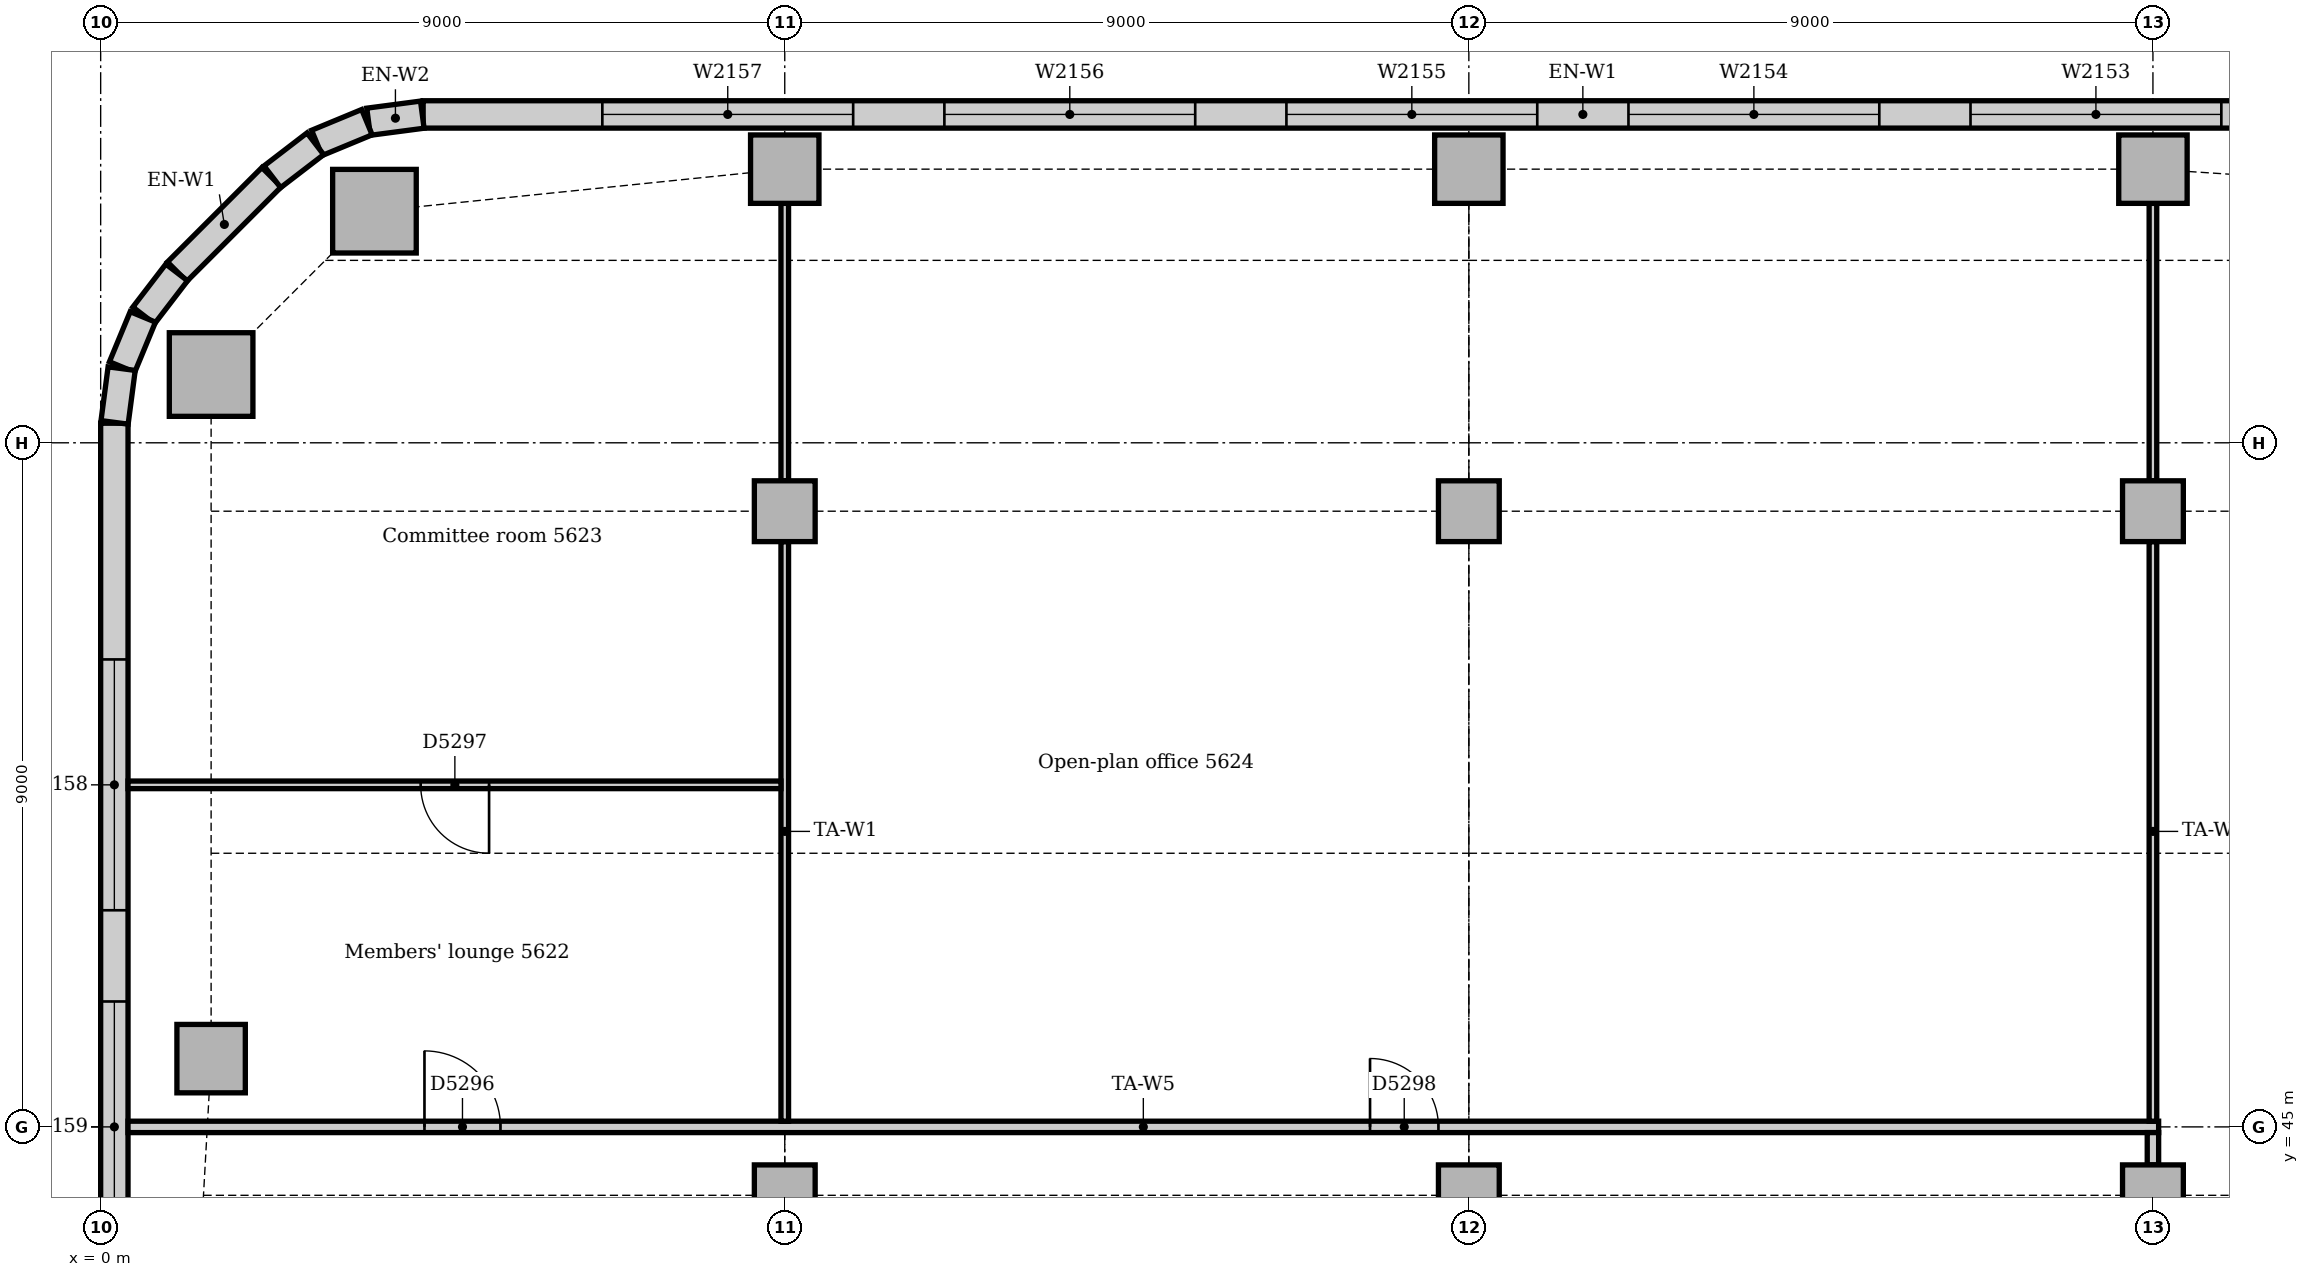
"""IFC4 building model, lengths in metres.
Left out: names, types, materials, properties, quantities, classifications, styles, units other than length and angle.
Written with IfcOpenShell. Run it as: python <this file> out.ifc"""

import sys

from ifc_helpers import new_model, si_unit, direction, frame, frame_2d, origin, origin_2d, place, context, subcontext, project, spatial, rectangle, extrude, element, fill, save


model = new_model("IFC4")
c1 = context("Model", 3, precision=1e-05, world=origin(), true_north=direction((0.0, 1.0)))
c2 = subcontext(c1, "Body", "Model", "MODEL_VIEW")
j1 = project(units=[si_unit("LENGTHUNIT", "METRE"), si_unit("PLANEANGLEUNIT", "RADIAN")], contexts=[c1])
p1 = place(None, origin())
s1 = spatial("IfcSite", under=j1, at=p1, CompositionType="ELEMENT")
p2 = place(p1, origin())
s2 = spatial("IfcBuilding", under=s1, at=p2, CompositionType="ELEMENT")
p3 = place(p2, frame((0.0, 0.0, 234.0)))
s3 = spatial("IfcBuildingStorey", under=s2, at=p3, CompositionType="ELEMENT", Elevation=234.0)
for number, where, z_axis, x_axis in (
    (1, (3.602, 57.047, 0.0), (0.0, 0.0, 1.0), (1.0, 0.0, 0.0)),
    (2, (1.453, 54.898, 0.0), (0.0, 0.0, 1.0), (1.0, 0.0, 0.0)),
):
    element("IfcColumn", number, at=place(p3, frame(where, z_axis=z_axis, x_axis=x_axis)), inside=s3, PredefinedType="COLUMN", context=c2, shape_type="SweptSolid", body=[
        extrude(rectangle(XDim=1.1, YDim=1.1, at=origin_2d()), origin(), (0.0, 0.0, 1.0), 3.85),
    ])
for number, where, z_axis, x_axis in (
    (3, (9.0, 57.6, 0.0), (0.0, 0.0, 1.0), (1.0, 0.0, 0.0)),
    (4, (18.0, 57.6, 0.0), (0.0, 0.0, 1.0), (1.0, 0.0, 0.0)),
    (5, (27.0, 57.6, 0.0), (0.0, 0.0, 1.0), (1.0, 0.0, 0.0)),
    (6, (1.453, 45.898, 0.0), (0.0, 0.0, 1.0), (1.0, 0.0, 0.0)),
):
    element("IfcColumn", number, at=place(p3, frame(where, z_axis=z_axis, x_axis=x_axis)), inside=s3, PredefinedType="COLUMN", context=c2, shape_type="SweptSolid", body=[
        extrude(rectangle(XDim=0.9, YDim=0.9, at=origin_2d()), origin(), (0.0, 0.0, 1.0), 3.85),
    ])
for number, where, z_axis, x_axis in (
    (7, (9.0, 44.1, 0.0), (0.0, 0.0, 1.0), (1.0, 0.0, 0.0)),
    (8, (9.0, 53.1, 0.0), (0.0, 0.0, 1.0), (1.0, 0.0, 0.0)),
    (9, (18.0, 44.1, 0.0), (0.0, 0.0, 1.0), (1.0, 0.0, 0.0)),
    (10, (18.0, 53.1, 0.0), (0.0, 0.0, 1.0), (1.0, 0.0, 0.0)),
    (11, (27.0, 44.1, 0.0), (0.0, 0.0, 1.0), (1.0, 0.0, 0.0)),
    (12, (27.0, 53.1, 0.0), (0.0, 0.0, 1.0), (1.0, 0.0, 0.0)),
):
    element("IfcColumn", number, at=place(p3, frame(where, z_axis=z_axis, x_axis=x_axis)), inside=s3, PredefinedType="COLUMN", context=c2, shape_type="SweptSolid", body=[
        extrude(rectangle(XDim=0.8, YDim=0.8, at=origin_2d()), origin(), (0.0, 0.0, 1.0), 3.85),
    ])
p4 = place(p3, frame((34.757, 58.32, 0.0), z_axis=(0.0, 0.0, 1.0), x_axis=(-1.0, 0.0, 0.0)))
e13 = element("IfcWall", 13, at=p4, inside=s3, PredefinedType="STANDARD", context=c2, shape_type="SweptSolid", body=[
    extrude(rectangle(XDim=30.515, YDim=0.36, at=frame_2d((15.257, 0.0))), origin(), (0.0, 0.0, 1.0), 3.85),
])
p5 = place(p4, frame((2.357, 0.0, 0.9)))
e14 = element("IfcOpeningElement", 14, at=p5, cuts=e13, PredefinedType="OPENING", context=c2, shape_type="SweptSolid", body=[
    extrude(rectangle(XDim=3.3, YDim=1.6, at=frame_2d((1.65, 0.8))), frame((0.0, 0.19, 0.0), z_axis=(0.0, -1.0, 0.0), x_axis=(1.0, 0.0, 0.0)), (0.0, 0.0, 1.0), 0.38),
])
p6 = place(p4, frame((6.857, 0.0, 0.9)))
e15 = element("IfcOpeningElement", 15, at=p6, cuts=e13, PredefinedType="OPENING", context=c2, shape_type="SweptSolid", body=[
    extrude(rectangle(XDim=3.3, YDim=1.6, at=frame_2d((1.65, 0.8))), frame((0.0, 0.19, 0.0), z_axis=(0.0, -1.0, 0.0), x_axis=(1.0, 0.0, 0.0)), (0.0, 0.0, 1.0), 0.38),
])
p7 = place(p4, frame((11.357, 0.0, 0.9)))
e16 = element("IfcOpeningElement", 16, at=p7, cuts=e13, PredefinedType="OPENING", context=c2, shape_type="SweptSolid", body=[
    extrude(rectangle(XDim=3.3, YDim=1.6, at=frame_2d((1.65, 0.8))), frame((0.0, 0.19, 0.0), z_axis=(0.0, -1.0, 0.0), x_axis=(1.0, 0.0, 0.0)), (0.0, 0.0, 1.0), 0.38),
])
p8 = place(p4, frame((15.857, 0.0, 0.9)))
e17 = element("IfcOpeningElement", 17, at=p8, cuts=e13, PredefinedType="OPENING", context=c2, shape_type="SweptSolid", body=[
    extrude(rectangle(XDim=3.3, YDim=1.6, at=frame_2d((1.65, 0.8))), frame((0.0, 0.19, 0.0), z_axis=(0.0, -1.0, 0.0), x_axis=(1.0, 0.0, 0.0)), (0.0, 0.0, 1.0), 0.38),
])
p9 = place(p4, frame((20.357, 0.0, 0.9)))
e18 = element("IfcOpeningElement", 18, at=p9, cuts=e13, PredefinedType="OPENING", context=c2, shape_type="SweptSolid", body=[
    extrude(rectangle(XDim=3.3, YDim=1.6, at=frame_2d((1.65, 0.8))), frame((0.0, 0.19, 0.0), z_axis=(0.0, -1.0, 0.0), x_axis=(1.0, 0.0, 0.0)), (0.0, 0.0, 1.0), 0.38),
])
p10 = place(p4, frame((24.857, 0.0, 0.9)))
e19 = element("IfcOpeningElement", 19, at=p10, cuts=e13, PredefinedType="OPENING", context=c2, shape_type="SweptSolid", body=[
    extrude(rectangle(XDim=3.3, YDim=1.6, at=frame_2d((1.65, 0.8))), frame((0.0, 0.19, 0.0), z_axis=(0.0, -1.0, 0.0), x_axis=(1.0, 0.0, 0.0)), (0.0, 0.0, 1.0), 0.38),
])
p11 = place(p3, frame((2.249, 57.494, 0.0), z_axis=(0.0, 0.0, 1.0), x_axis=(-0.707106781187, -0.707106781187, 0.0)))
e20 = element("IfcWall", 20, at=p11, inside=s3, PredefinedType="STANDARD", context=c2, shape_type="SweptSolid", body=[
    extrude(rectangle(XDim=1.757, YDim=0.36, at=frame_2d((0.879, 0.0))), origin(), (0.0, 0.0, 1.0), 3.85),
])
p12 = place(p3, frame((0.18, 54.257, 0.0), z_axis=(0.0, 0.0, 1.0), x_axis=(0.0, -1.0, 0.0)))
e21 = element("IfcWall", 21, at=p12, inside=s3, PredefinedType="STANDARD", context=c2, shape_type="SweptSolid", body=[
    extrude(rectangle(XDim=12.257, YDim=0.36, at=frame_2d((6.129, 0.0))), origin(), (0.0, 0.0, 1.0), 3.85),
])
p13 = place(p12, frame((3.107, 0.0, 0.9)))
e22 = element("IfcOpeningElement", 22, at=p13, cuts=e21, PredefinedType="OPENING", context=c2, shape_type="SweptSolid", body=[
    extrude(rectangle(XDim=3.3, YDim=1.6, at=frame_2d((1.65, 0.8))), frame((0.0, 0.19, 0.0), z_axis=(0.0, -1.0, 0.0), x_axis=(1.0, 0.0, 0.0)), (0.0, 0.0, 1.0), 0.38),
])
p14 = place(p12, frame((7.607, 0.0, 0.9)))
e23 = element("IfcOpeningElement", 23, at=p14, cuts=e21, PredefinedType="OPENING", context=c2, shape_type="SweptSolid", body=[
    extrude(rectangle(XDim=3.3, YDim=1.6, at=frame_2d((1.65, 0.8))), frame((0.0, 0.19, 0.0), z_axis=(0.0, -1.0, 0.0), x_axis=(1.0, 0.0, 0.0)), (0.0, 0.0, 1.0), 0.38),
])
for number, where, z_axis, x_axis in (
    (24, (4.231, 58.317, 0.0), (0.0, 0.0, 1.0), (-0.991, -0.131, 0.0)),
    (25, (3.503, 58.218, 0.0), (0.0, 0.0, 1.0), (-0.924, -0.383, 0.0)),
):
    element("IfcWall", number, at=place(p3, frame(where, z_axis=z_axis, x_axis=x_axis)), inside=s3, PredefinedType="STANDARD", context=c2, shape_type="SweptSolid", body=[
        extrude(rectangle(XDim=0.713, YDim=0.36, at=frame_2d((0.356, 0.0))), origin(), (0.0, 0.0, 1.0), 3.85),
    ])
for number, where, z_axis, x_axis in (
    (26, (2.825, 57.934, 0.0), (0.0, 0.0, 1.0), (-0.793, -0.609, 0.0)),
    (27, (1.0, 56.241, 0.0), (0.0, 0.0, 1.0), (-0.609, -0.793, 0.0)),
):
    element("IfcWall", number, at=place(p3, frame(where, z_axis=z_axis, x_axis=x_axis)), inside=s3, PredefinedType="STANDARD", context=c2, shape_type="SweptSolid", body=[
        extrude(rectangle(XDim=0.713, YDim=0.36, at=frame_2d((0.357, 0.0))), origin(), (0.0, 0.0, 1.0), 3.85),
    ])
for number, where, z_axis, x_axis in (
    (28, (0.555, 55.656, 0.0), (0.0, 0.0, 1.0), (-0.383, -0.924, 0.0)),
    (29, (0.276, 54.976, 0.0), (0.0, 0.0, 1.0), (-0.131, -0.991, 0.0)),
):
    element("IfcWall", number, at=place(p3, frame(where, z_axis=z_axis, x_axis=x_axis)), inside=s3, PredefinedType="STANDARD", context=c2, shape_type="SweptSolid", body=[
        extrude(rectangle(XDim=0.713, YDim=0.36, at=frame_2d((0.356, 0.0))), origin(), (0.0, 0.0, 1.0), 3.85),
    ])
p15 = place(p3, frame((0.36, 45.0, 0.0), z_axis=(0.0, 0.0, 1.0), x_axis=(1.0, 0.0, 0.0)))
e30 = element("IfcWall", 30, at=p15, inside=s3, PredefinedType="PARTITIONING", context=c2, shape_type="SweptSolid", body=[
    extrude(rectangle(XDim=26.715, YDim=0.15, at=frame_2d((13.357, 0.0))), origin(), (0.0, 0.0, 1.0), 3.85),
])
p16 = place(p15, frame((3.9, 0.0, 0.0)))
e31 = element("IfcOpeningElement", 31, at=p16, cuts=e30, PredefinedType="OPENING", context=c2, shape_type="SweptSolid", body=[
    extrude(rectangle(XDim=1.0, YDim=2.1, at=frame_2d((0.5, 1.05))), frame((0.0, 0.085, 0.0), z_axis=(0.0, -1.0, 0.0), x_axis=(1.0, 0.0, 0.0)), (0.0, 0.0, 1.0), 0.17),
])
p17 = place(p15, frame((16.34, 0.0, 0.0)))
e32 = element("IfcOpeningElement", 32, at=p17, cuts=e30, PredefinedType="OPENING", context=c2, shape_type="SweptSolid", body=[
    extrude(rectangle(XDim=0.9, YDim=2.1, at=frame_2d((0.45, 1.05))), frame((0.0, 0.085, 0.0), z_axis=(0.0, -1.0, 0.0), x_axis=(1.0, 0.0, 0.0)), (0.0, 0.0, 1.0), 0.17),
])
p18 = place(p3, frame((27.0, 44.5, 0.0), z_axis=(0.0, 0.0, 1.0), x_axis=(0.0, 1.0, 0.0)))
e33 = element("IfcWall", 33, at=p18, inside=s3, PredefinedType="PARTITIONING", context=c2, shape_type="SweptSolid", body=[
    extrude(rectangle(XDim=0.425, YDim=0.15, at=frame_2d((0.212, 0.0))), origin(), (0.0, 0.0, 1.0), 3.85),
])
p19 = place(p3, frame((9.0, 45.075, 0.0), z_axis=(0.0, 0.0, 1.0), x_axis=(0.0, 1.0, 0.0)))
e34 = element("IfcWall", 34, at=p19, inside=s3, PredefinedType="PARTITIONING", context=c2, shape_type="SweptSolid", body=[
    extrude(rectangle(XDim=7.625, YDim=0.1, at=frame_2d((3.812, 0.0))), origin(), (0.0, 0.0, 1.0), 3.35),
])
p20 = place(p3, frame((9.0, 53.5, 0.0), z_axis=(0.0, 0.0, 1.0), x_axis=(0.0, 1.0, 0.0)))
e35 = element("IfcWall", 35, at=p20, inside=s3, PredefinedType="PARTITIONING", context=c2, shape_type="SweptSolid", body=[
    extrude(rectangle(XDim=3.65, YDim=0.1, at=frame_2d((1.825, 0.0))), origin(), (0.0, 0.0, 1.0), 3.41),
])
p21 = place(p3, frame((27.0, 45.075, 0.0), z_axis=(0.0, 0.0, 1.0), x_axis=(0.0, 1.0, 0.0)))
e36 = element("IfcWall", 36, at=p21, inside=s3, PredefinedType="PARTITIONING", context=c2, shape_type="SweptSolid", body=[
    extrude(rectangle(XDim=7.625, YDim=0.1, at=frame_2d((3.812, 0.0))), origin(), (0.0, 0.0, 1.0), 3.35),
])
p22 = place(p3, frame((27.0, 53.5, 0.0), z_axis=(0.0, 0.0, 1.0), x_axis=(0.0, 1.0, 0.0)))
e37 = element("IfcWall", 37, at=p22, inside=s3, PredefinedType="PARTITIONING", context=c2, shape_type="SweptSolid", body=[
    extrude(rectangle(XDim=3.65, YDim=0.1, at=frame_2d((1.825, 0.0))), origin(), (0.0, 0.0, 1.0), 3.41),
])
p23 = place(p3, frame((0.36, 49.5, 0.0), z_axis=(0.0, 0.0, 1.0), x_axis=(1.0, 0.0, 0.0)))
e38 = element("IfcWall", 38, at=p23, inside=s3, PredefinedType="PARTITIONING", context=c2, shape_type="SweptSolid", body=[
    extrude(rectangle(XDim=8.59, YDim=0.1, at=frame_2d((4.295, 0.0))), origin(), (0.0, 0.0, 1.0), 3.85),
])
p24 = place(p23, frame((3.85, 0.0, 0.0)))
e39 = element("IfcOpeningElement", 39, at=p24, cuts=e38, PredefinedType="OPENING", context=c2, shape_type="SweptSolid", body=[
    extrude(rectangle(XDim=0.9, YDim=2.1, at=frame_2d((0.45, 1.05))), frame((0.0, 0.06, 0.0), z_axis=(0.0, -1.0, 0.0), x_axis=(1.0, 0.0, 0.0)), (0.0, 0.0, 1.0), 0.12),
])
p25 = place(p6, origin())
e40 = element("IfcWindow", 40, at=p25, inside=s3, PartitioningType="SINGLE_PANEL", PredefinedType="WINDOW", context=c2, shape_type="SweptSolid", body=[
    extrude(rectangle(XDim=3.3, YDim=1.6, at=frame_2d((1.65, 0.8))), frame((0.0, 0.13, 0.0), z_axis=(0.0, -1.0, 0.0), x_axis=(1.0, 0.0, 0.0)), (0.0, 0.0, 1.0), 0.06),
])
fill(e15, e40)
p26 = place(p7, origin())
e41 = element("IfcWindow", 41, at=p26, inside=s3, PartitioningType="SINGLE_PANEL", PredefinedType="WINDOW", context=c2, shape_type="SweptSolid", body=[
    extrude(rectangle(XDim=3.3, YDim=1.6, at=frame_2d((1.65, 0.8))), frame((0.0, 0.13, 0.0), z_axis=(0.0, -1.0, 0.0), x_axis=(1.0, 0.0, 0.0)), (0.0, 0.0, 1.0), 0.06),
])
fill(e16, e41)
p27 = place(p8, origin())
e42 = element("IfcWindow", 42, at=p27, inside=s3, PartitioningType="SINGLE_PANEL", PredefinedType="WINDOW", context=c2, shape_type="SweptSolid", body=[
    extrude(rectangle(XDim=3.3, YDim=1.6, at=frame_2d((1.65, 0.8))), frame((0.0, 0.13, 0.0), z_axis=(0.0, -1.0, 0.0), x_axis=(1.0, 0.0, 0.0)), (0.0, 0.0, 1.0), 0.06),
])
fill(e17, e42)
p28 = place(p9, origin())
e43 = element("IfcWindow", 43, at=p28, inside=s3, PartitioningType="SINGLE_PANEL", PredefinedType="WINDOW", context=c2, shape_type="SweptSolid", body=[
    extrude(rectangle(XDim=3.3, YDim=1.6, at=frame_2d((1.65, 0.8))), frame((0.0, 0.13, 0.0), z_axis=(0.0, -1.0, 0.0), x_axis=(1.0, 0.0, 0.0)), (0.0, 0.0, 1.0), 0.06),
])
fill(e18, e43)
p29 = place(p10, origin())
e44 = element("IfcWindow", 44, at=p29, inside=s3, PartitioningType="SINGLE_PANEL", PredefinedType="WINDOW", context=c2, shape_type="SweptSolid", body=[
    extrude(rectangle(XDim=3.3, YDim=1.6, at=frame_2d((1.65, 0.8))), frame((0.0, 0.13, 0.0), z_axis=(0.0, -1.0, 0.0), x_axis=(1.0, 0.0, 0.0)), (0.0, 0.0, 1.0), 0.06),
])
fill(e19, e44)
p30 = place(p13, origin())
e45 = element("IfcWindow", 45, at=p30, inside=s3, PartitioningType="SINGLE_PANEL", PredefinedType="WINDOW", context=c2, shape_type="SweptSolid", body=[
    extrude(rectangle(XDim=3.3, YDim=1.6, at=frame_2d((1.65, 0.8))), frame((0.0, 0.13, 0.0), z_axis=(0.0, -1.0, 0.0), x_axis=(1.0, 0.0, 0.0)), (0.0, 0.0, 1.0), 0.06),
])
fill(e22, e45)
p31 = place(p14, origin())
e46 = element("IfcWindow", 46, at=p31, inside=s3, PartitioningType="SINGLE_PANEL", PredefinedType="WINDOW", context=c2, shape_type="SweptSolid", body=[
    extrude(rectangle(XDim=3.3, YDim=1.6, at=frame_2d((1.65, 0.8))), frame((0.0, 0.13, 0.0), z_axis=(0.0, -1.0, 0.0), x_axis=(1.0, 0.0, 0.0)), (0.0, 0.0, 1.0), 0.06),
])
fill(e23, e46)
p32 = place(p16, origin())
e47 = element("IfcDoor", 47, at=p32, inside=s3, OperationType="SINGLE_SWING_LEFT", PredefinedType="DOOR", context=c2, shape_type="SweptSolid", body=[
    extrude(rectangle(XDim=1.0, YDim=2.1, at=frame_2d((0.5, 1.05))), frame((0.0, 0.025, 0.0), z_axis=(0.0, -1.0, 0.0), x_axis=(1.0, 0.0, 0.0)), (0.0, 0.0, 1.0), 0.05),
])
fill(e31, e47)
p33 = place(p24, frame((0.9, 0.0, 0.0), z_axis=(0.0, 0.0, 1.0), x_axis=(-1.0, 0.0, 0.0)))
e48 = element("IfcDoor", 48, at=p33, inside=s3, OperationType="SINGLE_SWING_LEFT", PredefinedType="DOOR", context=c2, shape_type="SweptSolid", body=[
    extrude(rectangle(XDim=0.9, YDim=2.1, at=frame_2d((0.45, 1.05))), frame((0.0, 0.025, 0.0), z_axis=(0.0, -1.0, 0.0), x_axis=(1.0, 0.0, 0.0)), (0.0, 0.0, 1.0), 0.05),
])
fill(e39, e48)
p34 = place(p17, origin())
e49 = element("IfcDoor", 49, at=p34, inside=s3, OperationType="SINGLE_SWING_LEFT", PredefinedType="DOOR", context=c2, shape_type="SweptSolid", body=[
    extrude(rectangle(XDim=0.9, YDim=2.1, at=frame_2d((0.45, 1.05))), frame((0.0, 0.025, 0.0), z_axis=(0.0, -1.0, 0.0), x_axis=(1.0, 0.0, 0.0)), (0.0, 0.0, 1.0), 0.05),
])
fill(e32, e49)
save(model, sys.argv[1])
